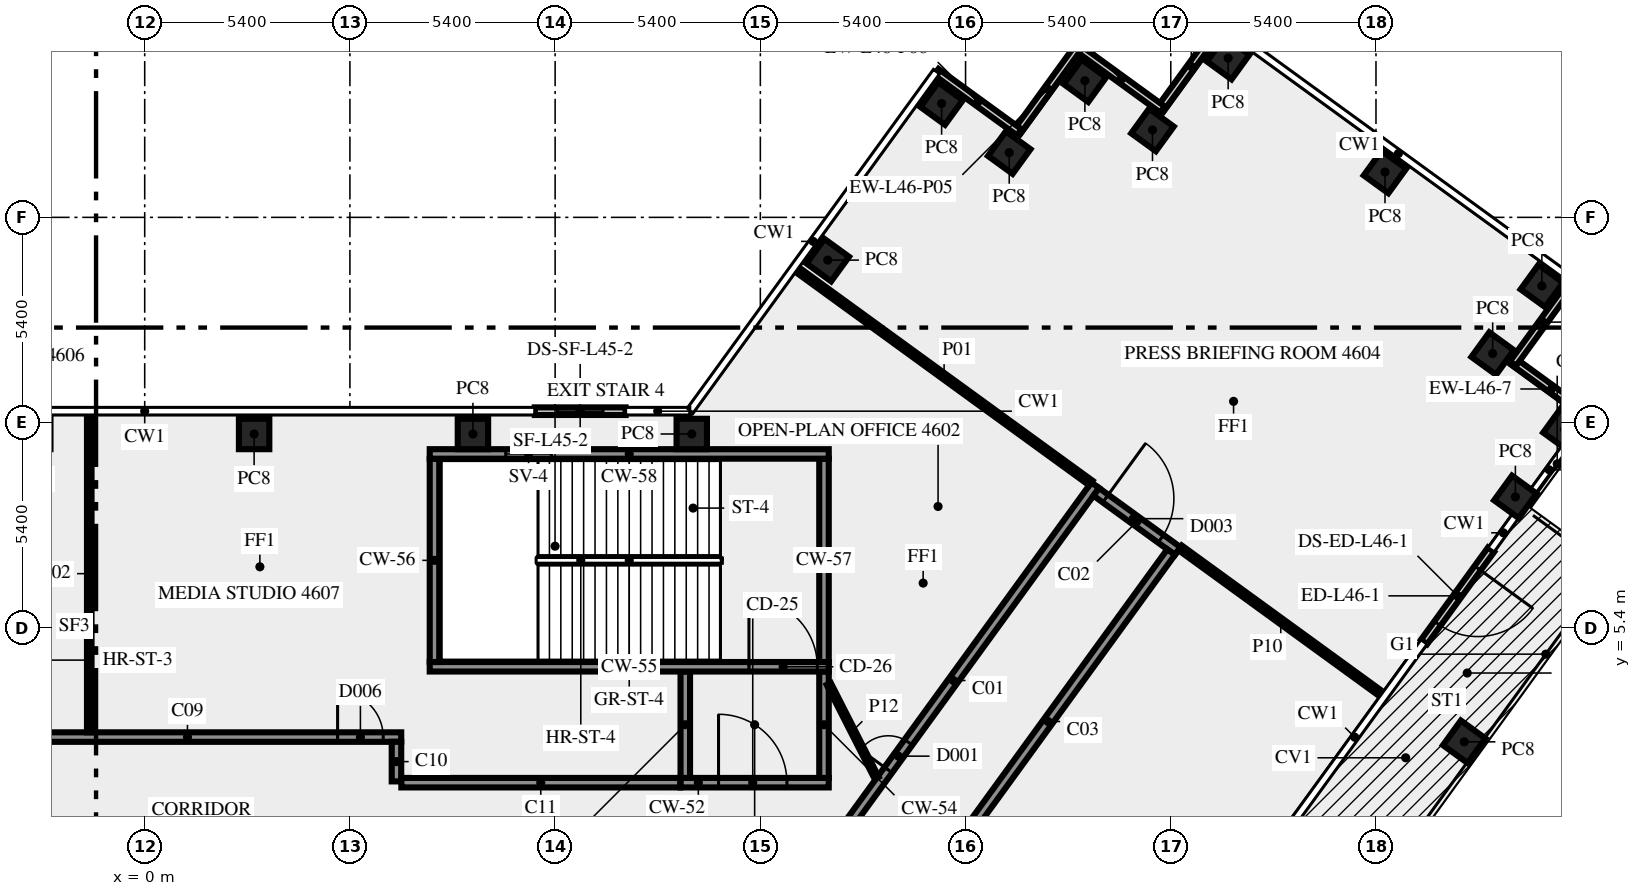
"""IFC4 building model, lengths in metres.
Left out: names, types, materials, properties, quantities, classifications, styles, units other than length and angle.
Written with IfcOpenShell. Run it as: python <this file> out.ifc"""

import sys

from ifc_helpers import new_model, si_unit, direction, frame, frame_2d, origin, origin_2d, place, context, subcontext, project, spatial, rectangle, extrude, element, fill, save


model = new_model("IFC4")
c1 = context("Model", 3, precision=1e-05, world=origin(), true_north=direction((0.0, 1.0)))
c2 = subcontext(c1, "Body", "Model", "MODEL_VIEW")
j1 = project(units=[si_unit("LENGTHUNIT", "METRE"), si_unit("PLANEANGLEUNIT", "RADIAN")], contexts=[c1])
p1 = place(None, origin())
s1 = spatial("IfcSite", under=j1, at=p1, CompositionType="ELEMENT")
p2 = place(p1, origin())
s2 = spatial("IfcBuilding", under=s1, at=p2, CompositionType="ELEMENT")
p3 = place(p2, frame((0.0, 0.0, 198.0)))
s3 = spatial("IfcBuildingStorey", under=s2, at=p3, CompositionType="ELEMENT", Elevation=198.0)
for number, where, z_axis, x_axis in (
    (1, (34.722, 2.4, 0.0), (0.0, 0.0, 1.0), (0.588, 0.809, 0.0)),
    (2, (36.068, 8.844, 0.0), (0.0, 0.0, 1.0), (0.588, 0.809, 0.0)),
    (3, (37.36, 10.625, 0.0), (0.0, 0.0, 1.0), (0.588, 0.809, 0.0)),
    (4, (35.471, 12.616, 0.0), (0.0, 0.0, 1.0), (-0.809, 0.588, 0.0)),
    (5, (36.765, 14.395, 0.0), (0.0, 0.0, 1.0), (-0.809, 0.588, 0.0)),
    (6, (32.637, 17.393, 0.0), (0.0, 0.0, 1.0), (-0.809, 0.588, 0.0)),
    (7, (28.51, 20.39, 0.0), (0.0, 0.0, 1.0), (-0.588, -0.809, 0.0)),
    (8, (26.519, 18.5, 0.0), (0.0, 0.0, 1.0), (-0.809, 0.588, 0.0)),
    (9, (24.74, 19.795, 0.0), (0.0, 0.0, 1.0), (-0.588, -0.809, 0.0)),
    (10, (22.749, 17.904, 0.0), (0.0, 0.0, 1.0), (-0.588, -0.809, 0.0)),
    (11, (20.97, 19.195, 0.0), (0.0, 0.0, 1.0), (-0.588, -0.809, 0.0)),
    (12, (17.974, 15.075, 0.0), (0.0, 0.0, 1.0), (-0.588, -0.809, 0.0)),
    (13, (14.395, 10.5, 0.0), (0.0, 0.0, 1.0), (-1.0, 0.0, 0.0)),
    (14, (8.637, 10.5, 0.0), (0.0, 0.0, 1.0), (-1.0, 0.0, 0.0)),
    (15, (2.879, 10.5, 0.0), (0.0, 0.0, 1.0), (-1.0, 0.0, 0.0)),
):
    element("IfcColumn", number, at=place(p3, frame(where, z_axis=z_axis, x_axis=x_axis)), inside=s3, PredefinedType="COLUMN", context=c2, shape_type="SweptSolid", body=[
        extrude(rectangle(XDim=0.8, YDim=0.8, at=origin_2d()), origin(), (0.0, 0.0, 1.0), 3.65),
    ])
p4 = place(p3, frame((35.428, 7.455, 0.0), z_axis=(0.0, 0.0, 1.0), x_axis=(-0.587755461469, -0.809038637837, 0.0)))
e16 = element("IfcWall", 16, at=p4, inside=s3, PredefinedType="SOLIDWALL", context=c2, shape_type="SweptSolid", body=[
    extrude(rectangle(XDim=3.0, YDim=0.2, at=frame_2d((1.5, 0.0))), origin(), (0.0, 0.0, 1.0), 3.65),
])
p5 = place(p4, frame((0.6, 0.0, 0.0)))
e17 = element("IfcOpeningElement", 17, at=p5, cuts=e16, PredefinedType="OPENING", context=c2, shape_type="SweptSolid", body=[
    extrude(rectangle(XDim=1.8, YDim=2.4, at=frame_2d((0.9, 1.2))), frame((0.0, 0.11, 0.0), z_axis=(0.0, -1.0, 0.0), x_axis=(1.0, 0.0, 0.0)), (0.0, 0.0, 1.0), 0.22),
])
p6 = place(p3, frame((37.989, 10.979, 0.0), z_axis=(0.0, 0.0, 1.0), x_axis=(-0.808942790066, 0.587887372207, 0.0)))
e18 = element("IfcWall", 18, at=p6, inside=s3, PredefinedType="SOLIDWALL", context=c2, shape_type="SweptSolid", body=[
    extrude(rectangle(XDim=2.4, YDim=0.2, at=frame_2d((1.2, 0.0))), origin(), (0.0, 0.0, 1.0), 3.65),
])
for number, where, z_axis, x_axis in (
    (19, (36.005, 12.352, 0.0), (0.0, 0.0, 1.0), (0.588, 0.809, 0.0)),
    (20, (28.334, 21.262, 0.0), (0.0, 0.0, 1.0), (-0.588, -0.809, 0.0)),
):
    element("IfcWall", number, at=place(p3, frame(where, z_axis=z_axis, x_axis=x_axis)), inside=s3, PredefinedType="SOLIDWALL", context=c2, shape_type="SweptSolid", body=[
        extrude(rectangle(XDim=2.7, YDim=0.2, at=frame_2d((1.35, 0.0))), origin(), (0.0, 0.0, 1.0), 3.65),
    ])
p7 = place(p3, frame((26.785, 19.036, 0.0), z_axis=(0.0, 0.0, 1.0), x_axis=(-0.809064397168, 0.587720002413, 0.0)))
e21 = element("IfcWall", 21, at=p7, inside=s3, PredefinedType="SOLIDWALL", context=c2, shape_type="SweptSolid", body=[
    extrude(rectangle(XDim=2.7, YDim=0.2, at=frame_2d((1.35, 0.0))), origin(), (0.0, 0.0, 1.0), 3.65),
])
for number, where, z_axis, x_axis in (
    (22, (24.563, 20.665, 0.0), (0.0, 0.0, 1.0), (-0.588, -0.809, 0.0)),
    (23, (23.013, 18.438, 0.0), (0.0, 0.0, 1.0), (-0.809, 0.588, 0.0)),
):
    element("IfcWall", number, at=place(p3, frame(where, z_axis=z_axis, x_axis=x_axis)), inside=s3, PredefinedType="SOLIDWALL", context=c2, shape_type="SweptSolid", body=[
        extrude(rectangle(XDim=2.7, YDim=0.2, at=frame_2d((1.35, 0.0))), origin(), (0.0, 0.0, 1.0), 3.65),
    ])
p8 = place(p3, frame((12.655, 11.1, 0.0), z_axis=(0.0, 0.0, 1.0), x_axis=(-1.0, 0.0, 0.0)))
e24 = element("IfcWall", 24, at=p8, inside=s3, PredefinedType="SOLIDWALL", context=c2, shape_type="SweptSolid", body=[
    extrude(rectangle(XDim=2.392, YDim=0.2, at=frame_2d((1.196, 0.0))), origin(), (0.0, 0.0, 1.0), 3.65),
])
p9 = place(p8, frame((0.596, 0.0, 1.0)))
e25 = element("IfcOpeningElement", 25, at=p9, cuts=e24, PredefinedType="OPENING", context=c2, shape_type="SweptSolid", body=[
    extrude(rectangle(XDim=1.2, YDim=1.2, at=frame_2d((0.6, 0.6))), frame((0.0, 0.11, 0.0), z_axis=(0.0, -1.0, 0.0), x_axis=(1.0, 0.0, 0.0)), (0.0, 0.0, 1.0), 0.22),
])
p10 = place(p3, frame((14.1, 1.325, 0.0), z_axis=(0.0, 0.0, 1.0), x_axis=(1.0, 0.0, 0.0)))
e26 = element("IfcWall", 26, at=p10, inside=s3, PredefinedType="SHEAR", context=c2, shape_type="SweptSolid", body=[
    extrude(rectangle(XDim=3.9, YDim=0.25, at=frame_2d((1.95, 0.0))), origin(), (0.0, 0.0, 1.0), 3.65),
])
p11 = place(p10, frame((1.0, 0.0, 0.0)))
e27 = element("IfcOpeningElement", 27, at=p11, cuts=e26, PredefinedType="OPENING", context=c2, shape_type="SweptSolid", body=[
    extrude(rectangle(XDim=1.8, YDim=2.1, at=frame_2d((0.9, 1.05))), frame((0.0, 0.135, 0.0), z_axis=(0.0, -1.0, 0.0), x_axis=(1.0, 0.0, 0.0)), (0.0, 0.0, 1.0), 0.27),
])
for number, where, z_axis, x_axis in (
    (28, (14.225, 1.45, 0.0), (0.0, 0.0, 1.0), (0.0, 1.0, 0.0)),
    (29, (17.875, 1.45, 0.0), (0.0, 0.0, 1.0), (0.0, 1.0, 0.0)),
):
    element("IfcWall", number, at=place(p3, frame(where, z_axis=z_axis, x_axis=x_axis)), inside=s3, PredefinedType="SHEAR", context=c2, shape_type="SweptSolid", body=[
        extrude(rectangle(XDim=2.8, YDim=0.25, at=frame_2d((1.4, 0.0))), origin(), (0.0, 0.0, 1.0), 3.65),
    ])
p12 = place(p3, frame((7.5, 4.375, 0.0), z_axis=(0.0, 0.0, 1.0), x_axis=(1.0, 0.0, 0.0)))
e30 = element("IfcWall", 30, at=p12, inside=s3, PredefinedType="SHEAR", context=c2, shape_type="SweptSolid", body=[
    extrude(rectangle(XDim=10.5, YDim=0.25, at=frame_2d((5.25, 0.0))), origin(), (0.0, 0.0, 1.0), 3.65),
])
p13 = place(p12, frame((8.4, 0.0, 0.0)))
e31 = element("IfcOpeningElement", 31, at=p13, cuts=e30, PredefinedType="OPENING", context=c2, shape_type="SweptSolid", body=[
    extrude(rectangle(XDim=1.8, YDim=2.1, at=frame_2d((0.9, 1.05))), frame((0.0, 0.135, 0.0), z_axis=(0.0, -1.0, 0.0), x_axis=(1.0, 0.0, 0.0)), (0.0, 0.0, 1.0), 0.27),
])
for number, where, z_axis, x_axis in (
    (32, (7.625, 4.5, 0.0), (0.0, 0.0, 1.0), (0.0, 1.0, 0.0)),
    (33, (17.875, 4.5, 0.0), (0.0, 0.0, 1.0), (0.0, 1.0, 0.0)),
):
    element("IfcWall", number, at=place(p3, frame(where, z_axis=z_axis, x_axis=x_axis)), inside=s3, PredefinedType="SHEAR", context=c2, shape_type="SweptSolid", body=[
        extrude(rectangle(XDim=5.35, YDim=0.25, at=frame_2d((2.675, 0.0))), origin(), (0.0, 0.0, 1.0), 3.65),
    ])
p14 = place(p3, frame((7.5, 9.975, 0.0), z_axis=(0.0, 0.0, 1.0), x_axis=(1.0, 0.0, 0.0)))
e34 = element("IfcWall", 34, at=p14, inside=s3, PredefinedType="SHEAR", context=c2, shape_type="SweptSolid", body=[
    extrude(rectangle(XDim=10.5, YDim=0.25, at=frame_2d((5.25, 0.0))), origin(), (0.0, 0.0, 1.0), 3.65),
])
p15 = place(p14, frame((2.0, 0.0, 1.0)))
e35 = element("IfcOpeningElement", 35, at=p15, cuts=e34, PredefinedType="OPENING", context=c2, shape_type="SweptSolid", body=[
    extrude(rectangle(XDim=1.2, YDim=1.2, at=frame_2d((0.6, 0.6))), frame((0.0, 0.135, 0.0), z_axis=(0.0, -1.0, 0.0), x_axis=(1.0, 0.0, 0.0)), (0.0, 0.0, 1.0), 0.27),
])
p16 = place(p3, frame((17.545, -1.125, 0.0), z_axis=(0.0, 0.0, 1.0), x_axis=(0.587796810203, 0.809008596935, 0.0)))
e36 = element("IfcWall", 36, at=p16, inside=s3, PredefinedType="SOLIDWALL", context=c2, shape_type="SweptSolid", body=[
    extrude(rectangle(XDim=12.703, YDim=0.25, at=frame_2d((6.352, 0.0))), origin(), (0.0, 0.0, 1.0), 3.65),
])
p17 = place(p16, frame((3.441, 0.0, 0.0)))
e37 = element("IfcOpeningElement", 37, at=p17, cuts=e36, PredefinedType="OPENING", context=c2, shape_type="SweptSolid", body=[
    extrude(rectangle(XDim=0.9, YDim=2.1, at=frame_2d((0.45, 1.05))), frame((0.0, 0.135, 0.0), z_axis=(0.0, -1.0, 0.0), x_axis=(1.0, 0.0, 0.0)), (0.0, 0.0, 1.0), 0.27),
])
p18 = place(p3, frame((25.039, 8.978, 0.0), z_axis=(0.0, 0.0, 1.0), x_axis=(0.809006914995, -0.587799125119, 0.0)))
e38 = element("IfcWall", 38, at=p18, inside=s3, PredefinedType="SOLIDWALL", context=c2, shape_type="SweptSolid", body=[
    extrude(rectangle(XDim=2.65, YDim=0.25, at=frame_2d((1.325, 0.0))), origin(), (0.0, 0.0, 1.0), 3.65),
])
p19 = place(p18, frame((0.301, 0.0, 0.0)))
e39 = element("IfcOpeningElement", 39, at=p19, cuts=e38, PredefinedType="OPENING", context=c2, shape_type="SweptSolid", body=[
    extrude(rectangle(XDim=1.8, YDim=2.1, at=frame_2d((0.9, 1.05))), frame((0.0, 0.135, 0.0), z_axis=(0.0, -1.0, 0.0), x_axis=(1.0, 0.0, 0.0)), (0.0, 0.0, 1.0), 0.27),
])
p20 = place(p3, frame((27.009, 7.392, 0.0), z_axis=(0.0, 0.0, 1.0), x_axis=(-0.587776457057, -0.809023384414, 0.0)))
e40 = element("IfcWall", 40, at=p20, inside=s3, PredefinedType="SOLIDWALL", context=c2, shape_type="SweptSolid", body=[
    extrude(rectangle(XDim=11.021, YDim=0.25, at=frame_2d((5.51, 0.0))), origin(), (0.0, 0.0, 1.0), 3.65),
])
p21 = place(p20, frame((9.588, 0.0, 0.0)))
e41 = element("IfcOpeningElement", 41, at=p21, cuts=e40, PredefinedType="OPENING", context=c2, shape_type="SweptSolid", body=[
    extrude(rectangle(XDim=0.9, YDim=2.1, at=frame_2d((0.45, 1.05))), frame((0.0, 0.135, 0.0), z_axis=(0.0, -1.0, 0.0), x_axis=(1.0, 0.0, 0.0)), (0.0, 0.0, 1.0), 0.27),
])
p22 = place(p3, frame((-4.5, 2.525, 0.0), z_axis=(0.0, 0.0, 1.0), x_axis=(1.0, 0.0, 0.0)))
e42 = element("IfcWall", 42, at=p22, inside=s3, PredefinedType="SOLIDWALL", context=c2, shape_type="SweptSolid", body=[
    extrude(rectangle(XDim=11.25, YDim=0.25, at=frame_2d((5.625, 0.0))), origin(), (0.0, 0.0, 1.0), 3.65),
])
p23 = place(p22, frame((0.224, 0.0, 0.0)))
e43 = element("IfcOpeningElement", 43, at=p23, cuts=e42, PredefinedType="OPENING", context=c2, shape_type="SweptSolid", body=[
    extrude(rectangle(XDim=0.9, YDim=2.1, at=frame_2d((0.45, 1.05))), frame((0.0, 0.135, 0.0), z_axis=(0.0, -1.0, 0.0), x_axis=(1.0, 0.0, 0.0)), (0.0, 0.0, 1.0), 0.27),
])
p24 = place(p22, frame((9.576, 0.0, 0.0)))
e44 = element("IfcOpeningElement", 44, at=p24, cuts=e42, PredefinedType="OPENING", context=c2, shape_type="SweptSolid", body=[
    extrude(rectangle(XDim=1.2, YDim=2.1, at=frame_2d((0.6, 1.05))), frame((0.0, 0.135, 0.0), z_axis=(0.0, -1.0, 0.0), x_axis=(1.0, 0.0, 0.0)), (0.0, 0.0, 1.0), 0.27),
])
p25 = place(p3, frame((6.625, 2.4, 0.0), z_axis=(0.0, 0.0, 1.0), x_axis=(0.0, -1.0, 0.0)))
e45 = element("IfcWall", 45, at=p25, inside=s3, PredefinedType="SOLIDWALL", context=c2, shape_type="SweptSolid", body=[
    extrude(rectangle(XDim=1.041, YDim=0.25, at=frame_2d((0.521, 0.0))), origin(), (0.0, 0.0, 1.0), 3.65),
])
p26 = place(p3, frame((6.754, 1.325, 0.0), z_axis=(0.0, 0.0, 1.0), x_axis=(1.0, 0.0, 0.0)))
e46 = element("IfcWall", 46, at=p26, inside=s3, PredefinedType="SOLIDWALL", context=c2, shape_type="SweptSolid", body=[
    extrude(rectangle(XDim=7.336, YDim=0.25, at=frame_2d((3.668, 0.0))), origin(), (0.0, 0.0, 1.0), 3.65),
])
p27 = place(p3, frame((24.898, 9.21, 0.0), z_axis=(0.0, 0.0, 1.0), x_axis=(-0.809046636998, 0.587744450559, 0.0)))
e47 = element("IfcWall", 47, at=p27, inside=s3, PredefinedType="PARTITIONING", context=c2, shape_type="SweptSolid", body=[
    extrude(rectangle(XDim=9.549, YDim=0.15, at=frame_2d((4.775, 0.0))), origin(), (0.0, 0.0, 1.0), 2.85),
])
p28 = place(p3, frame((-1.459, 2.65, 0.0), z_axis=(0.0, 0.0, 1.0), x_axis=(0.0, 1.0, 0.0)))
e48 = element("IfcWall", 48, at=p28, inside=s3, PredefinedType="PARTITIONING", context=c2, shape_type="SweptSolid", body=[
    extrude(rectangle(XDim=8.35, YDim=0.12, at=frame_2d((4.175, 0.0))), origin(), (0.0, 0.0, 1.0), 2.85),
])
p29 = place(p3, frame((32.544, 3.655, 0.0), z_axis=(0.0, 0.0, 1.0), x_axis=(-0.809045452372, 0.587746081226, 0.0)))
e49 = element("IfcWall", 49, at=p29, inside=s3, PredefinedType="PARTITIONING", context=c2, shape_type="SweptSolid", body=[
    extrude(rectangle(XDim=6.55, YDim=0.15, at=frame_2d((3.275, 0.0))), origin(), (0.0, 0.0, 1.0), 3.65),
])
p30 = place(p3, frame((18.0, 3.925, 0.0), z_axis=(0.0, 0.0, 1.0), x_axis=(0.453950796792, -0.891026752736, 0.0)))
e50 = element("IfcWall", 50, at=p30, inside=s3, PredefinedType="PARTITIONING", context=c2, shape_type="SweptSolid", body=[
    extrude(rectangle(XDim=2.778, YDim=0.12, at=frame_2d((1.389, 0.0))), origin(), (0.0, 0.0, 1.0), 3.65),
])
p31 = place(p5, origin())
e51 = element("IfcDoor", 51, at=p31, inside=s3, OperationType="DOUBLE_DOOR_SINGLE_SWING", PredefinedType="DOOR", context=c2, shape_type="SweptSolid", body=[
    extrude(rectangle(XDim=1.8, YDim=2.4, at=frame_2d((0.9, 1.2))), frame((0.0, 0.025, 0.0), z_axis=(0.0, -1.0, 0.0), x_axis=(1.0, 0.0, 0.0)), (0.0, 0.0, 1.0), 0.05),
])
fill(e17, e51)
p32 = place(p9, origin())
e52 = element("IfcWindow", 52, at=p32, inside=s3, PartitioningType="SINGLE_PANEL", PredefinedType="WINDOW", context=c2, shape_type="SweptSolid", body=[
    extrude(rectangle(XDim=1.2, YDim=1.2, at=frame_2d((0.6, 0.6))), frame((0.0, 0.03, 0.0), z_axis=(0.0, -1.0, 0.0), x_axis=(1.0, 0.0, 0.0)), (0.0, 0.0, 1.0), 0.06),
])
fill(e25, e52)
p33 = place(p11, origin())
e53 = element("IfcDoor", 53, at=p33, inside=s3, OperationType="DOUBLE_DOOR_SINGLE_SWING", PredefinedType="DOOR", context=c2, shape_type="SweptSolid", body=[
    extrude(rectangle(XDim=1.8, YDim=2.1, at=frame_2d((0.9, 1.05))), frame((0.0, 0.025, 0.0), z_axis=(0.0, -1.0, 0.0), x_axis=(1.0, 0.0, 0.0)), (0.0, 0.0, 1.0), 0.05),
])
fill(e27, e53)
p34 = place(p13, origin())
e54 = element("IfcDoor", 54, at=p34, inside=s3, OperationType="DOUBLE_DOOR_SINGLE_SWING", PredefinedType="DOOR", context=c2, shape_type="SweptSolid", body=[
    extrude(rectangle(XDim=1.8, YDim=2.1, at=frame_2d((0.9, 1.05))), frame((0.0, 0.025, 0.0), z_axis=(0.0, -1.0, 0.0), x_axis=(1.0, 0.0, 0.0)), (0.0, 0.0, 1.0), 0.05),
])
fill(e31, e54)
p35 = place(p15, origin())
e55 = element("IfcWindow", 55, at=p35, inside=s3, PartitioningType="SINGLE_PANEL", PredefinedType="WINDOW", context=c2, shape_type="SweptSolid", body=[
    extrude(rectangle(XDim=1.2, YDim=1.2, at=frame_2d((0.6, 0.6))), frame((0.0, 0.03, 0.0), z_axis=(0.0, -1.0, 0.0), x_axis=(1.0, 0.0, 0.0)), (0.0, 0.0, 1.0), 0.06),
])
fill(e35, e55)
p36 = place(p17, origin())
e56 = element("IfcDoor", 56, at=p36, inside=s3, OperationType="SINGLE_SWING_LEFT", PredefinedType="DOOR", context=c2, shape_type="SweptSolid", body=[
    extrude(rectangle(XDim=0.9, YDim=2.1, at=frame_2d((0.45, 1.05))), frame((0.0, 0.025, 0.0), z_axis=(0.0, -1.0, 0.0), x_axis=(1.0, 0.0, 0.0)), (0.0, 0.0, 1.0), 0.05),
])
fill(e37, e56)
p37 = place(p19, origin())
e57 = element("IfcDoor", 57, at=p37, inside=s3, OperationType="DOUBLE_DOOR_SINGLE_SWING", PredefinedType="DOOR", context=c2, shape_type="SweptSolid", body=[
    extrude(rectangle(XDim=1.8, YDim=2.1, at=frame_2d((0.9, 1.05))), frame((0.0, 0.025, 0.0), z_axis=(0.0, -1.0, 0.0), x_axis=(1.0, 0.0, 0.0)), (0.0, 0.0, 1.0), 0.05),
])
fill(e39, e57)
p38 = place(p24, origin())
e58 = element("IfcDoor", 58, at=p38, inside=s3, OperationType="SINGLE_SWING_RIGHT", PredefinedType="DOOR", context=c2, shape_type="SweptSolid", body=[
    extrude(rectangle(XDim=1.2, YDim=2.1, at=frame_2d((0.6, 1.05))), frame((0.0, 0.025, 0.0), z_axis=(0.0, -1.0, 0.0), x_axis=(1.0, 0.0, 0.0)), (0.0, 0.0, 1.0), 0.05),
])
fill(e44, e58)
save(model, sys.argv[1])
